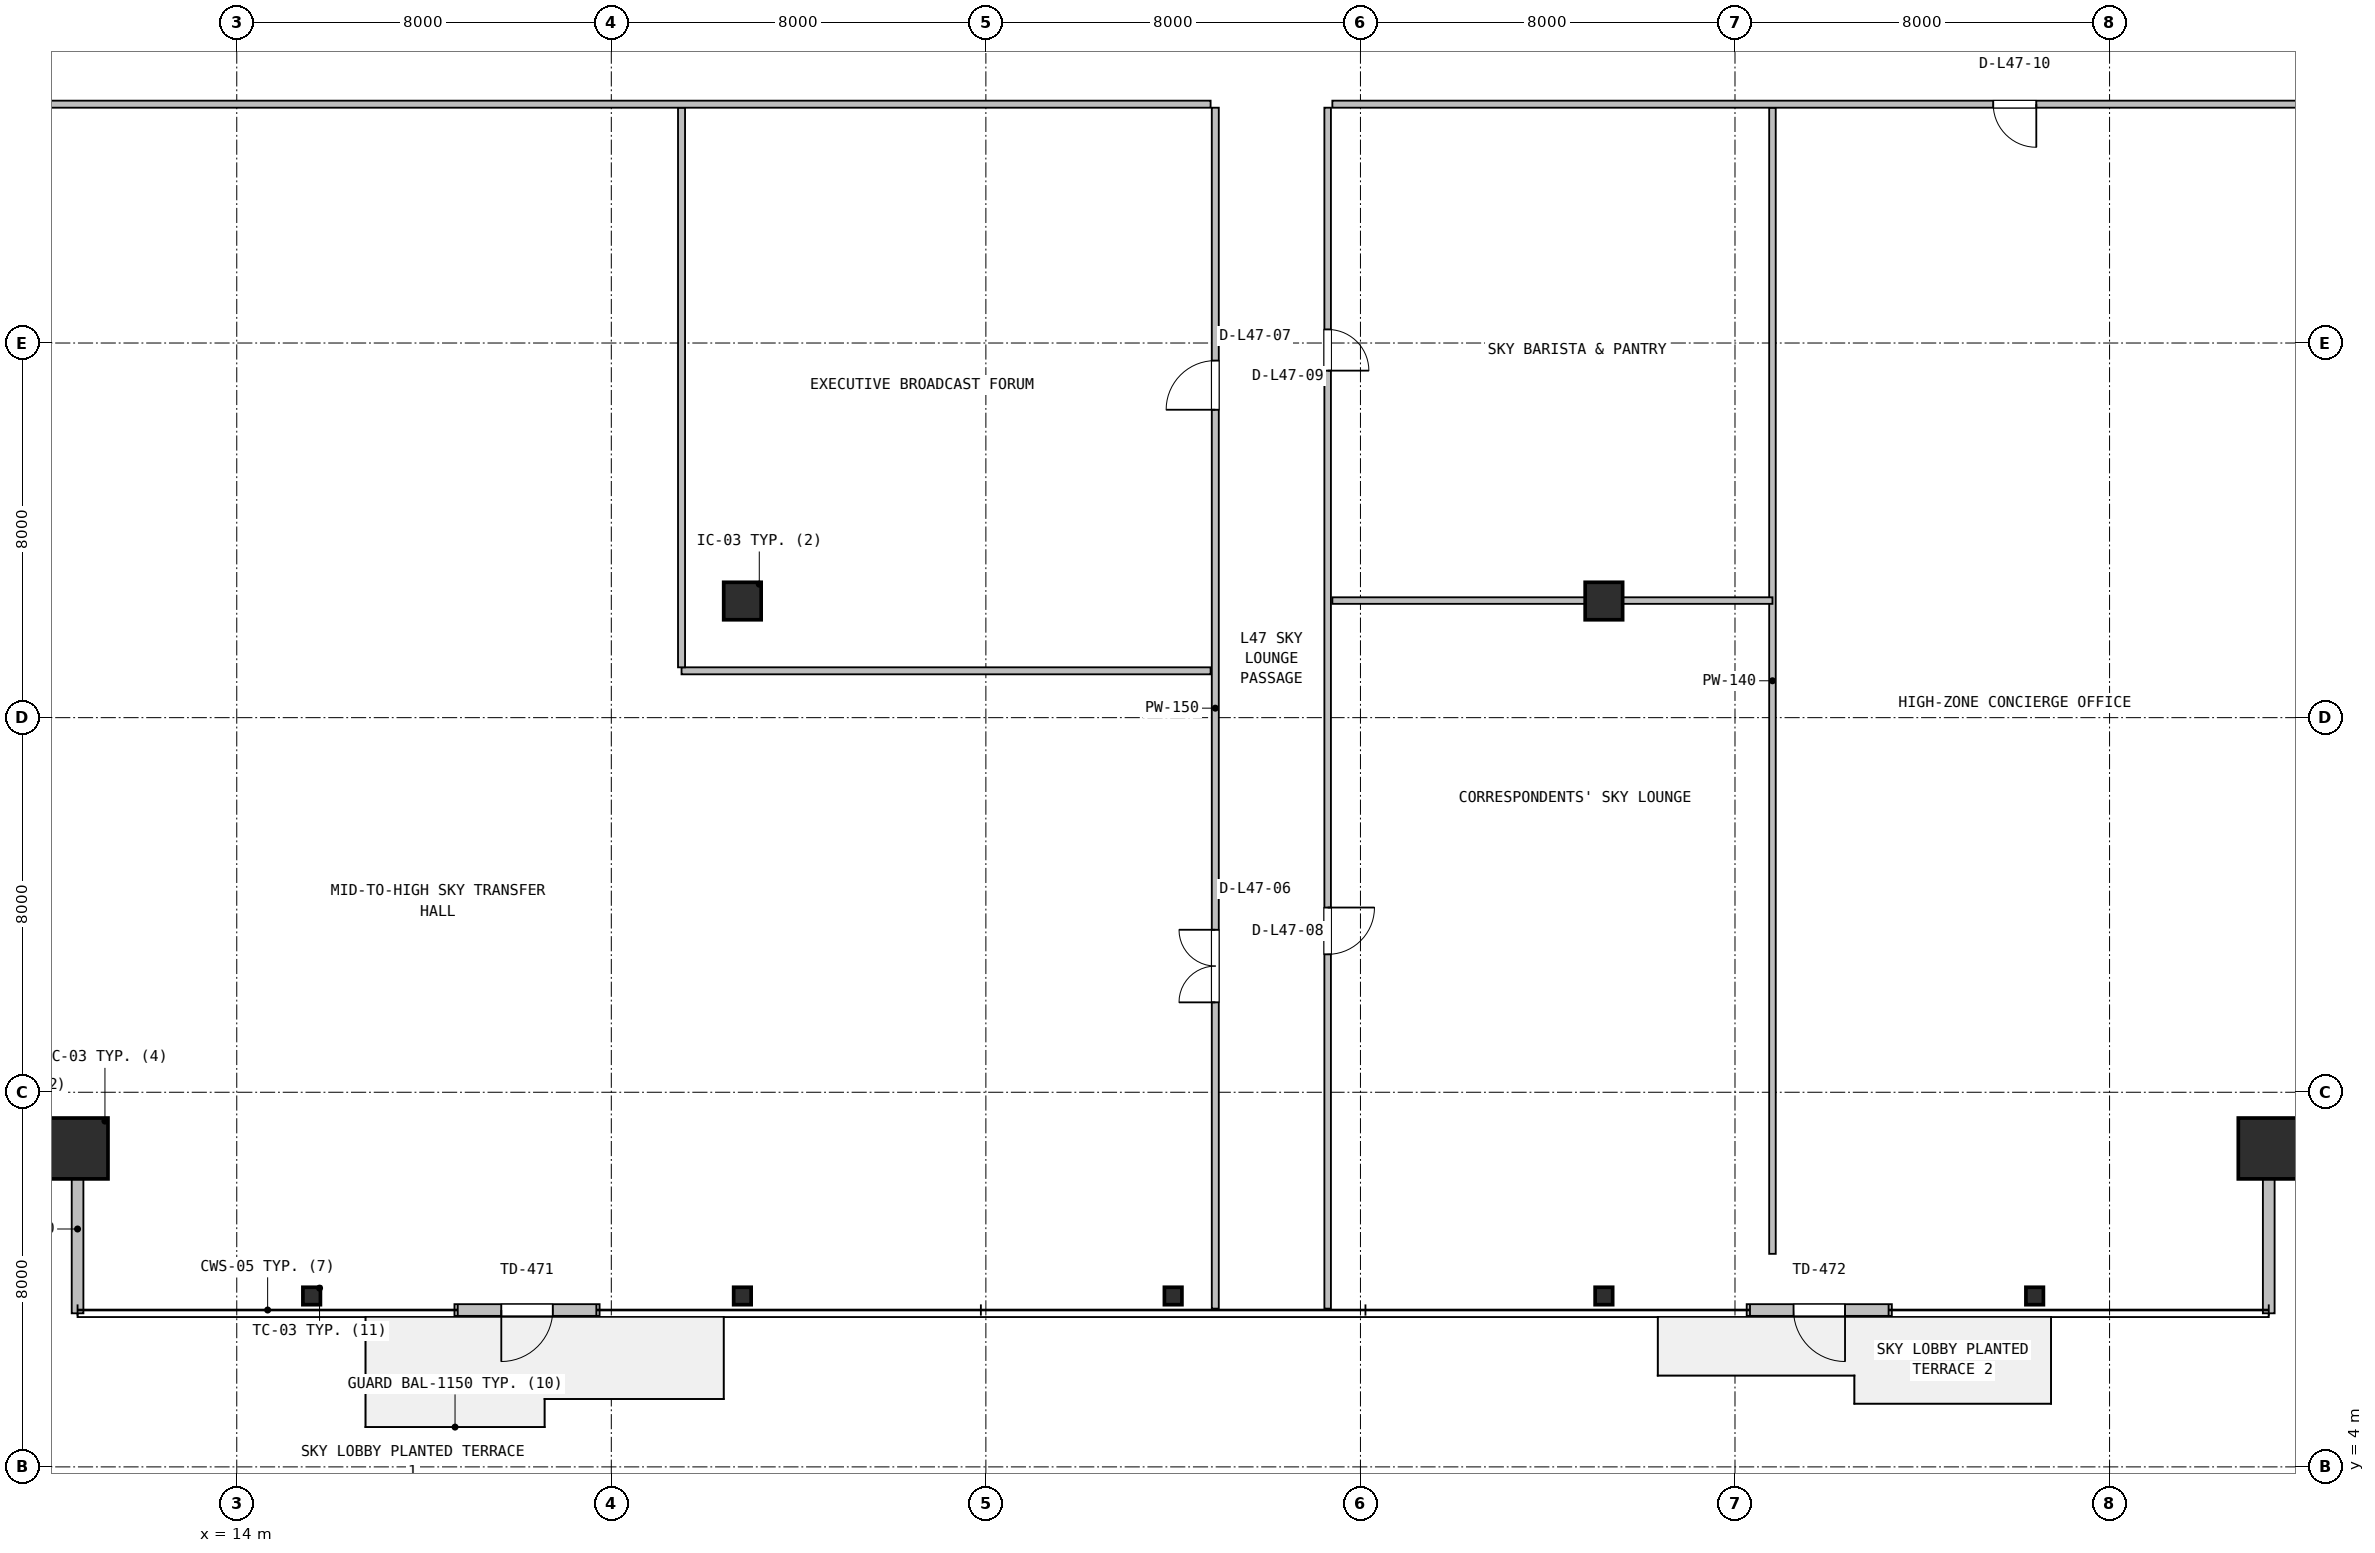
"""IFC4 building model, lengths in metres.
Left out: names, types, materials, properties, quantities, classifications, styles, units other than length and angle.
Written with IfcOpenShell. Run it as: python <this file> out.ifc"""

import sys

from ifc_helpers import new_model, si_unit, direction, frame, frame_2d, origin, origin_2d, place, context, subcontext, project, spatial, rectangle, hollow_rectangle, i_section, extrude, source, transform, mapped, element, fill, save


model = new_model("IFC4")
c1 = context("Model", 3, precision=1e-05, world=origin(), true_north=direction((0.0, 1.0)))
c2 = subcontext(c1, "Body", "Model", "MODEL_VIEW")
j1 = project(units=[si_unit("LENGTHUNIT", "METRE"), si_unit("PLANEANGLEUNIT", "RADIAN")], contexts=[c1])
p1 = place(None, origin())
s1 = spatial("IfcSite", under=j1, at=p1, CompositionType="ELEMENT")
p2 = place(p1, origin())
s2 = spatial("IfcBuilding", under=s1, at=p2, CompositionType="ELEMENT")
p3 = place(p2, frame((0.0, 0.0, 191.4)))
s3 = spatial("IfcBuildingStorey", under=s2, at=p3, CompositionType="ELEMENT", Elevation=191.4)
m1 = source(origin(), c2, "Body", "SweptSolid", [
    extrude(hollow_rectangle(XDim=1.3, YDim=1.3, WallThickness=0.05, at=origin_2d()), origin(), (0.0, 0.0, 1.0), 4.6),
])
for number, where, z_axis, x_axis in (
    (1, (10.6, 10.8, 0.0), (0.0, 0.0, 1.0), (1.0, 0.0, 0.0)),
    (2, (57.4, 10.8, 0.0), (0.0, 0.0, 1.0), (1.0, 0.0, 0.0)),
):
    element("IfcColumn", number, at=place(p3, frame(where, z_axis=z_axis, x_axis=x_axis)), inside=s3, PredefinedType="COLUMN", context=c2, shape_type="MappedRepresentation", body=[
        mapped(m1, transform((0.0, 0.0, 0.0), x_axis=(1.0, 0.0, 0.0), y_axis=(0.0, 1.0, 0.0), z_axis=(0.0, 0.0, 1.0), scale=1.0)),
    ])
m2 = source(origin(), c2, "Body", "SweptSolid", [
    extrude(i_section(OverallWidth=0.374, OverallDepth=0.372, WebThickness=0.016, FlangeThickness=0.026, FilletRadius=0.016, at=origin_2d()), origin(), (0.0, 0.0, 1.0), 4.6),
])
for number, where, z_axis, x_axis in (
    (3, (15.6, 7.65, 0.0), (0.0, 0.0, 1.0), (1.0, 0.0, 0.0)),
    (4, (24.8, 7.65, 0.0), (0.0, 0.0, 1.0), (1.0, 0.0, 0.0)),
    (5, (34.0, 7.65, 0.0), (0.0, 0.0, 1.0), (1.0, 0.0, 0.0)),
    (6, (43.2, 7.65, 0.0), (0.0, 0.0, 1.0), (1.0, 0.0, 0.0)),
    (7, (52.4, 7.65, 0.0), (0.0, 0.0, 1.0), (1.0, 0.0, 0.0)),
):
    element("IfcColumn", number, at=place(p3, frame(where, z_axis=z_axis, x_axis=x_axis)), inside=s3, PredefinedType="COLUMN", context=c2, shape_type="MappedRepresentation", body=[
        mapped(m2, transform((0.0, 0.0, 0.0), x_axis=(1.0, 0.0, 0.0), y_axis=(0.0, 1.0, 0.0), z_axis=(0.0, 0.0, 1.0), scale=1.0)),
    ])
m3 = source(origin(), c2, "Body", "SweptSolid", [
    extrude(rectangle(XDim=0.8, YDim=0.8, at=origin_2d()), origin(), (0.0, 0.0, 1.0), 4.6),
])
for number, where, z_axis, x_axis in (
    (8, (24.8, 22.49, 0.0), (0.0, 0.0, 1.0), (1.0, 0.0, 0.0)),
    (9, (43.2, 22.49, 0.0), (0.0, 0.0, 1.0), (1.0, 0.0, 0.0)),
):
    element("IfcColumn", number, at=place(p3, frame(where, z_axis=z_axis, x_axis=x_axis)), inside=s3, PredefinedType="COLUMN", context=c2, shape_type="MappedRepresentation", body=[
        mapped(m3, transform((0.0, 0.0, 0.0), x_axis=(1.0, 0.0, 0.0), y_axis=(0.0, 1.0, 0.0), z_axis=(0.0, 0.0, 1.0), scale=1.0)),
    ])
p4 = place(p3, frame((18.65, 7.35, 0.0), z_axis=(0.0, 0.0, 1.0), x_axis=(1.0, 0.0, 0.0)))
e10 = element("IfcWall", 10, at=p4, inside=s3, PredefinedType="SOLIDWALL", context=c2, shape_type="SweptSolid", body=[
    extrude(rectangle(XDim=3.1, YDim=0.25, at=frame_2d((1.55, 0.0))), origin(), (0.0, 0.0, 1.0), 4.33),
])
p5 = place(p4, frame((1.0, 0.0, 0.0)))
e11 = element("IfcOpeningElement", 11, at=p5, cuts=e10, PredefinedType="OPENING", context=c2, shape_type="SweptSolid", body=[
    extrude(rectangle(XDim=1.1, YDim=2.15, at=frame_2d((0.55, 1.075))), frame((0.0, 0.135, 0.0), z_axis=(0.0, -1.0, 0.0), x_axis=(1.0, 0.0, 0.0)), (0.0, 0.0, 1.0), 0.27),
])
p6 = place(p3, frame((46.25, 7.35, 0.0), z_axis=(0.0, 0.0, 1.0), x_axis=(1.0, 0.0, 0.0)))
e12 = element("IfcWall", 12, at=p6, inside=s3, PredefinedType="SOLIDWALL", context=c2, shape_type="SweptSolid", body=[
    extrude(rectangle(XDim=3.1, YDim=0.25, at=frame_2d((1.55, 0.0))), origin(), (0.0, 0.0, 1.0), 4.33),
])
p7 = place(p6, frame((1.0, 0.0, 0.0)))
e13 = element("IfcOpeningElement", 13, at=p7, cuts=e12, PredefinedType="OPENING", context=c2, shape_type="SweptSolid", body=[
    extrude(rectangle(XDim=1.1, YDim=2.15, at=frame_2d((0.55, 1.075))), frame((0.0, 0.135, 0.0), z_axis=(0.0, -1.0, 0.0), x_axis=(1.0, 0.0, 0.0)), (0.0, 0.0, 1.0), 0.27),
])
for number, where, z_axis, x_axis in (
    (14, (10.6, 7.28, 0.0), (0.0, 0.0, 1.0), (0.0, 1.0, 0.0)),
    (15, (57.4, 7.28, 0.0), (0.0, 0.0, 1.0), (0.0, 1.0, 0.0)),
):
    element("IfcWall", number, at=place(p3, frame(where, z_axis=z_axis, x_axis=x_axis)), inside=s3, PredefinedType="SOLIDWALL", context=c2, shape_type="SweptSolid", body=[
        extrude(rectangle(XDim=3.6, YDim=0.25, at=frame_2d((1.8, 0.0))), origin(), (0.0, 0.0, 1.0), 3.908),
    ])
p8 = place(p3, frame((34.9, 7.38, 0.0), z_axis=(0.0, 0.0, 1.0), x_axis=(0.0, 1.0, 0.0)))
e16 = element("IfcWall", 16, at=p8, inside=s3, PredefinedType="PARTITIONING", context=c2, shape_type="SweptSolid", body=[
    extrude(rectangle(XDim=25.645, YDim=0.15, at=frame_2d((12.823, 0.0))), origin(), (0.0, 0.0, 1.0), 3.709),
])
p9 = place(p8, frame((6.54, 0.0, 0.0)))
e17 = element("IfcOpeningElement", 17, at=p9, cuts=e16, PredefinedType="OPENING", context=c2, shape_type="SweptSolid", body=[
    extrude(rectangle(XDim=1.55, YDim=2.12, at=frame_2d((0.775, 1.06))), frame((0.0, 0.085, 0.0), z_axis=(0.0, -1.0, 0.0), x_axis=(1.0, 0.0, 0.0)), (0.0, 0.0, 1.0), 0.17),
])
p10 = place(p8, frame((19.195, 0.0, 0.0)))
e18 = element("IfcOpeningElement", 18, at=p10, cuts=e16, PredefinedType="OPENING", context=c2, shape_type="SweptSolid", body=[
    extrude(rectangle(XDim=1.05, YDim=2.1, at=frame_2d((0.525, 1.05))), frame((0.0, 0.085, 0.0), z_axis=(0.0, -1.0, 0.0), x_axis=(1.0, 0.0, 0.0)), (0.0, 0.0, 1.0), 0.17),
])
p11 = place(p3, frame((23.5, 21.0, 0.0), z_axis=(0.0, 0.0, 1.0), x_axis=(1.0, 0.0, 0.0)))
e19 = element("IfcWall", 19, at=p11, inside=s3, PredefinedType="PARTITIONING", context=c2, shape_type="SweptSolid", body=[
    extrude(rectangle(XDim=11.3, YDim=0.15, at=frame_2d((5.65, 0.0))), origin(), (0.0, 0.0, 1.0), 3.709),
])
p12 = place(p3, frame((23.5, 21.075, 0.0), z_axis=(0.0, 0.0, 1.0), x_axis=(0.0, 1.0, 0.0)))
e20 = element("IfcWall", 20, at=p12, inside=s3, PredefinedType="PARTITIONING", context=c2, shape_type="SweptSolid", body=[
    extrude(rectangle(XDim=11.95, YDim=0.15, at=frame_2d((5.975, 0.0))), origin(), (0.0, 0.0, 1.0), 4.022),
])
p13 = place(p3, frame((7.18, 33.1, 0.0), z_axis=(0.0, 0.0, 1.0), x_axis=(1.0, 0.0, 0.0)))
e21 = element("IfcWall", 21, at=p13, inside=s3, PredefinedType="PARTITIONING", context=c2, shape_type="SweptSolid", body=[
    extrude(rectangle(XDim=27.62, YDim=0.15, at=frame_2d((13.81, 0.0))), origin(), (0.0, 0.0, 1.0), 3.709),
])
p14 = place(p3, frame((46.8, 8.55, 0.0), z_axis=(0.0, 0.0, 1.0), x_axis=(0.0, 1.0, 0.0)))
e22 = element("IfcWall", 22, at=p14, inside=s3, PredefinedType="PARTITIONING", context=c2, shape_type="SweptSolid", body=[
    extrude(rectangle(XDim=24.475, YDim=0.14, at=frame_2d((12.237, 0.0))), origin(), (0.0, 0.0, 1.0), 4.022),
])
p15 = place(p3, frame((37.4, 22.5, 0.0), z_axis=(0.0, 0.0, 1.0), x_axis=(1.0, 0.0, 0.0)))
e23 = element("IfcWall", 23, at=p15, inside=s3, PredefinedType="PARTITIONING", context=c2, shape_type="SweptSolid", body=[
    extrude(rectangle(XDim=9.4, YDim=0.14, at=frame_2d((4.7, 0.0))), origin(), (0.0, 0.0, 1.0), 3.709),
])
p16 = place(p3, frame((37.3, 7.38, 0.0), z_axis=(0.0, 0.0, 1.0), x_axis=(0.0, 1.0, 0.0)))
e24 = element("IfcWall", 24, at=p16, inside=s3, PredefinedType="PARTITIONING", context=c2, shape_type="SweptSolid", body=[
    extrude(rectangle(XDim=25.645, YDim=0.14, at=frame_2d((12.823, 0.0))), origin(), (0.0, 0.0, 1.0), 3.709),
])
p17 = place(p16, frame((7.565, 0.0, 0.0)))
e25 = element("IfcOpeningElement", 25, at=p17, cuts=e24, PredefinedType="OPENING", context=c2, shape_type="SweptSolid", body=[
    extrude(rectangle(XDim=1.0, YDim=2.1, at=frame_2d((0.5, 1.05))), frame((0.0, 0.08, 0.0), z_axis=(0.0, -1.0, 0.0), x_axis=(1.0, 0.0, 0.0)), (0.0, 0.0, 1.0), 0.16),
])
p18 = place(p16, frame((20.03, 0.0, 0.0)))
e26 = element("IfcOpeningElement", 26, at=p18, cuts=e24, PredefinedType="OPENING", context=c2, shape_type="SweptSolid", body=[
    extrude(rectangle(XDim=0.88, YDim=2.06, at=frame_2d((0.44, 1.03))), frame((0.0, 0.08, 0.0), z_axis=(0.0, -1.0, 0.0), x_axis=(1.0, 0.0, 0.0)), (0.0, 0.0, 1.0), 0.16),
])
p19 = place(p3, frame((37.4, 33.1, 0.0), z_axis=(0.0, 0.0, 1.0), x_axis=(1.0, 0.0, 0.0)))
e27 = element("IfcWall", 27, at=p19, inside=s3, PredefinedType="PARTITIONING", context=c2, shape_type="SweptSolid", body=[
    extrude(rectangle(XDim=23.42, YDim=0.15, at=frame_2d((11.71, 0.0))), origin(), (0.0, 0.0, 1.0), 3.709),
])
p20 = place(p19, frame((14.115, 0.0, 0.0)))
e28 = element("IfcOpeningElement", 28, at=p20, cuts=e27, PredefinedType="OPENING", context=c2, shape_type="SweptSolid", body=[
    extrude(rectangle(XDim=0.92, YDim=2.08, at=frame_2d((0.46, 1.04))), frame((0.0, 0.085, 0.0), z_axis=(0.0, -1.0, 0.0), x_axis=(1.0, 0.0, 0.0)), (0.0, 0.0, 1.0), 0.17),
])
m4 = source(origin(), c2, "Body", "SweptSolid", [
    extrude(rectangle(XDim=1.1, YDim=2.15, at=frame_2d((0.55, 1.075))), frame((0.0, 0.025, 0.0), z_axis=(0.0, -1.0, 0.0), x_axis=(1.0, 0.0, 0.0)), (0.0, 0.0, 1.0), 0.05),
])
p21 = place(p5, frame((1.1, 0.0, 0.0), z_axis=(0.0, 0.0, 1.0), x_axis=(-1.0, 0.0, 0.0)))
e29 = element("IfcDoor", 29, at=p21, inside=s3, OperationType="SINGLE_SWING_LEFT", PredefinedType="DOOR", context=c2, shape_type="MappedRepresentation", body=[
    mapped(m4, transform((0.0, 0.0, 0.0), x_axis=(1.0, 0.0, 0.0), y_axis=(0.0, 1.0, 0.0), z_axis=(0.0, 0.0, 1.0), scale=1.0)),
])
fill(e11, e29)
p22 = place(p7, frame((1.1, 0.0, 0.0), z_axis=(0.0, 0.0, 1.0), x_axis=(-1.0, 0.0, 0.0)))
e30 = element("IfcDoor", 30, at=p22, inside=s3, OperationType="SINGLE_SWING_RIGHT", PredefinedType="DOOR", context=c2, shape_type="MappedRepresentation", body=[
    mapped(m4, transform((0.0, 0.0, 0.0), x_axis=(1.0, 0.0, 0.0), y_axis=(0.0, 1.0, 0.0), z_axis=(0.0, 0.0, 1.0), scale=1.0)),
])
fill(e13, e30)
m5 = source(origin(), c2, "Body", "SweptSolid", [
    extrude(rectangle(XDim=1.55, YDim=2.12, at=frame_2d((0.775, 1.06))), frame((0.0, 0.025, 0.0), z_axis=(0.0, -1.0, 0.0), x_axis=(1.0, 0.0, 0.0)), (0.0, 0.0, 1.0), 0.05),
])
p23 = place(p9, origin())
e31 = element("IfcDoor", 31, at=p23, inside=s3, OperationType="DOUBLE_DOOR_SINGLE_SWING", PredefinedType="DOOR", context=c2, shape_type="MappedRepresentation", body=[
    mapped(m5, transform((0.0, 0.0, 0.0), x_axis=(1.0, 0.0, 0.0), y_axis=(0.0, 1.0, 0.0), z_axis=(0.0, 0.0, 1.0), scale=1.0)),
])
fill(e17, e31)
m6 = source(origin(), c2, "Body", "SweptSolid", [
    extrude(rectangle(XDim=1.05, YDim=2.1, at=frame_2d((0.525, 1.05))), frame((0.0, 0.025, 0.0), z_axis=(0.0, -1.0, 0.0), x_axis=(1.0, 0.0, 0.0)), (0.0, 0.0, 1.0), 0.05),
])
p24 = place(p10, origin())
e32 = element("IfcDoor", 32, at=p24, inside=s3, OperationType="SINGLE_SWING_LEFT", PredefinedType="DOOR", context=c2, shape_type="MappedRepresentation", body=[
    mapped(m6, transform((0.0, 0.0, 0.0), x_axis=(1.0, 0.0, 0.0), y_axis=(0.0, 1.0, 0.0), z_axis=(0.0, 0.0, 1.0), scale=1.0)),
])
fill(e18, e32)
m7 = source(origin(), c2, "Body", "SweptSolid", [
    extrude(rectangle(XDim=1.0, YDim=2.1, at=frame_2d((0.5, 1.05))), frame((0.0, 0.025, 0.0), z_axis=(0.0, -1.0, 0.0), x_axis=(1.0, 0.0, 0.0)), (0.0, 0.0, 1.0), 0.05),
])
p25 = place(p17, frame((1.0, 0.0, 0.0), z_axis=(0.0, 0.0, 1.0), x_axis=(-1.0, 0.0, 0.0)))
e33 = element("IfcDoor", 33, at=p25, inside=s3, OperationType="SINGLE_SWING_RIGHT", PredefinedType="DOOR", context=c2, shape_type="MappedRepresentation", body=[
    mapped(m7, transform((0.0, 0.0, 0.0), x_axis=(1.0, 0.0, 0.0), y_axis=(0.0, 1.0, 0.0), z_axis=(0.0, 0.0, 1.0), scale=1.0)),
])
fill(e25, e33)
m8 = source(origin(), c2, "Body", "SweptSolid", [
    extrude(rectangle(XDim=0.88, YDim=2.06, at=frame_2d((0.44, 1.03))), frame((0.0, 0.025, 0.0), z_axis=(0.0, -1.0, 0.0), x_axis=(1.0, 0.0, 0.0)), (0.0, 0.0, 1.0), 0.05),
])
p26 = place(p18, frame((0.88, 0.0, 0.0), z_axis=(0.0, 0.0, 1.0), x_axis=(-1.0, 0.0, 0.0)))
e34 = element("IfcDoor", 34, at=p26, inside=s3, OperationType="SINGLE_SWING_LEFT", PredefinedType="DOOR", context=c2, shape_type="MappedRepresentation", body=[
    mapped(m8, transform((0.0, 0.0, 0.0), x_axis=(1.0, 0.0, 0.0), y_axis=(0.0, 1.0, 0.0), z_axis=(0.0, 0.0, 1.0), scale=1.0)),
])
fill(e26, e34)
m9 = source(origin(), c2, "Body", "SweptSolid", [
    extrude(rectangle(XDim=0.92, YDim=2.08, at=frame_2d((0.46, 1.04))), frame((0.0, 0.025, 0.0), z_axis=(0.0, -1.0, 0.0), x_axis=(1.0, 0.0, 0.0)), (0.0, 0.0, 1.0), 0.05),
])
p27 = place(p20, frame((0.92, 0.0, 0.0), z_axis=(0.0, 0.0, 1.0), x_axis=(-1.0, 0.0, 0.0)))
e35 = element("IfcDoor", 35, at=p27, inside=s3, OperationType="SINGLE_SWING_RIGHT", PredefinedType="DOOR", context=c2, shape_type="MappedRepresentation", body=[
    mapped(m9, transform((0.0, 0.0, 0.0), x_axis=(1.0, 0.0, 0.0), y_axis=(0.0, 1.0, 0.0), z_axis=(0.0, 0.0, 1.0), scale=1.0)),
])
fill(e28, e35)
save(model, sys.argv[1])
